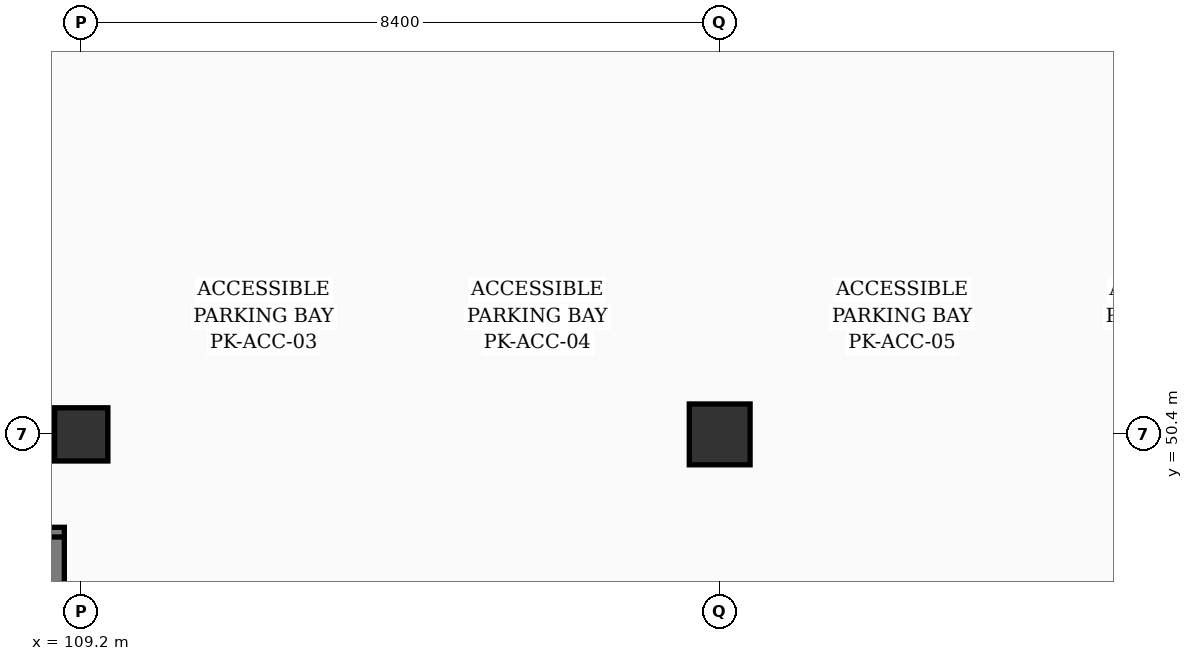
"""IFC4 building model, lengths in metres.
Left out: names, types, materials, properties, quantities, classifications, styles, units other than length and angle.
Written with IfcOpenShell. Run it as: python <this file> out.ifc"""

import sys

from ifc_helpers import new_model, si_unit, direction, frame, frame_2d, origin, origin_2d, place, context, subcontext, project, spatial, rectangle, extrude, element, save


model = new_model("IFC4")
c1 = context("Model", 3, precision=1e-05, world=origin(), true_north=direction((0.0, 1.0)))
c2 = subcontext(c1, "Body", "Model", "MODEL_VIEW")
j1 = project(units=[si_unit("LENGTHUNIT", "METRE"), si_unit("PLANEANGLEUNIT", "RADIAN")], contexts=[c1])
p1 = place(None, origin())
s1 = spatial("IfcSite", under=j1, at=p1, CompositionType="ELEMENT")
p2 = place(p1, origin())
s2 = spatial("IfcBuilding", under=s1, at=p2, CompositionType="ELEMENT")
p3 = place(p2, frame((0.0, 0.0, -4.2)))
s3 = spatial("IfcBuildingStorey", under=s2, at=p3, CompositionType="ELEMENT", Elevation=-4.2)
p4 = place(p3, frame((109.2, 50.4, 0.0), z_axis=(0.0, 0.0, 1.0), x_axis=(1.0, 0.0, 0.0)))
e1 = element("IfcColumn", 1, at=p4, inside=s3, PredefinedType="COLUMN", context=c2, shape_type="SweptSolid", body=[
    extrude(rectangle(XDim=0.7, YDim=0.7, at=origin_2d()), origin(), (0.0, 0.0, 1.0), 4.2),
])
p5 = place(p3, frame((117.6, 50.4, 0.0), z_axis=(0.0, 0.0, 1.0), x_axis=(1.0, 0.0, 0.0)))
e2 = element("IfcColumn", 2, at=p5, inside=s3, PredefinedType="COLUMN", context=c2, shape_type="SweptSolid", body=[
    extrude(rectangle(XDim=0.8, YDim=0.8, at=origin_2d()), origin(), (0.0, 0.0, 1.0), 4.2),
])
p6 = place(p3, frame((100.752, 49.05, -0.4), z_axis=(0.0, 0.0, 1.0), x_axis=(1.0, 0.0, 0.0)))
e3 = element("IfcWall", 3, at=p6, inside=s3, PredefinedType="SOLIDWALL", context=c2, shape_type="SweptSolid", body=[
    extrude(rectangle(XDim=8.225, YDim=0.255, at=frame_2d((4.113, 0.0))), origin(), (0.0, 0.0, 1.0), 4.25),
])
p7 = place(p3, frame((108.85, 45.2, -0.4), z_axis=(0.0, 0.0, 1.0), x_axis=(0.0, 1.0, 0.0)))
e4 = element("IfcWall", 4, at=p7, inside=s3, PredefinedType="SOLIDWALL", context=c2, shape_type="SweptSolid", body=[
    extrude(rectangle(XDim=3.85, YDim=0.255, at=frame_2d((1.925, 0.0))), origin(), (0.0, 0.0, 1.0), 4.25),
])
save(model, sys.argv[1])
